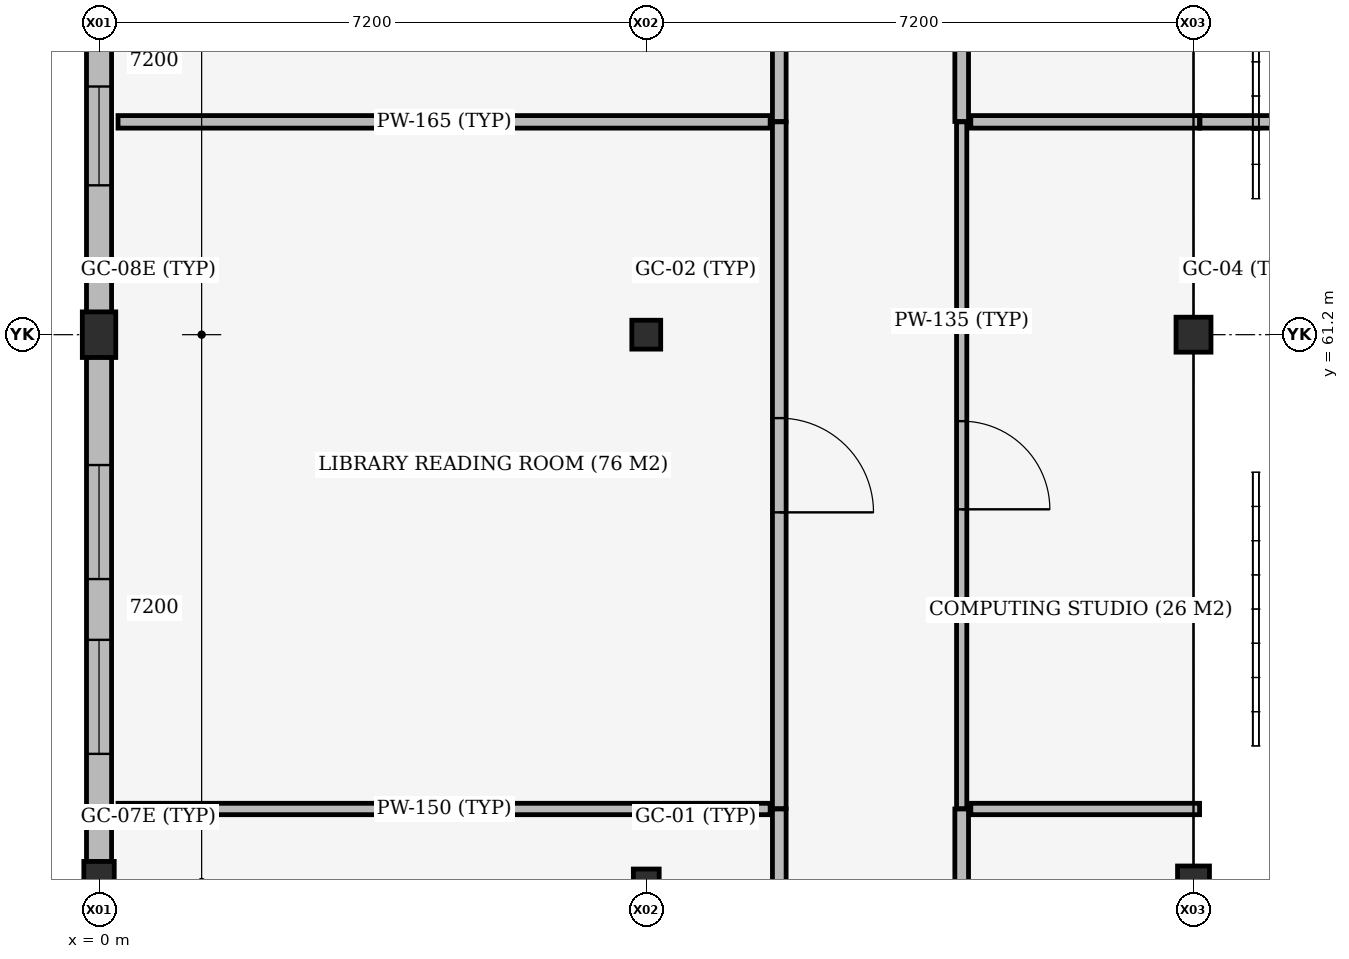
"""IFC4 building model, lengths in metres.
Left out: names, types, materials, properties, quantities, classifications, styles, units other than length and angle.
Written with IfcOpenShell. Run it as: python <this file> out.ifc"""

import sys

from ifc_helpers import new_model, si_unit, direction, frame, frame_2d, origin, origin_2d, place, context, subcontext, project, spatial, rectangle, extrude, element, fill, save


model = new_model("IFC4")
c1 = context("Model", 3, precision=1e-05, world=origin(), true_north=direction((0.0, 1.0)))
c2 = subcontext(c1, "Body", "Model", "MODEL_VIEW")
j1 = project(units=[si_unit("LENGTHUNIT", "METRE"), si_unit("PLANEANGLEUNIT", "RADIAN")], contexts=[c1])
p1 = place(None, origin())
s1 = spatial("IfcSite", under=j1, at=p1, CompositionType="ELEMENT")
p2 = place(p1, origin())
s2 = spatial("IfcBuilding", under=s1, at=p2, CompositionType="ELEMENT")
p3 = place(p2, frame((0.0, 0.0, 18.0)))
s3 = spatial("IfcBuildingStorey", under=s2, at=p3, CompositionType="ELEMENT", Elevation=18.0)
p4 = place(p3, frame((0.0, 54.0, 0.0), z_axis=(0.0, 0.0, 1.0), x_axis=(1.0, 0.0, 0.0)))
e1 = element("IfcColumn", 1, at=p4, inside=s3, PredefinedType="COLUMN", context=c2, shape_type="SweptSolid", body=[
    extrude(rectangle(XDim=0.4, YDim=0.54, at=origin_2d()), origin(), (0.0, 0.0, 1.0), 3.935),
])
p5 = place(p3, frame((0.0, 61.2, 0.0), z_axis=(0.0, 0.0, 1.0), x_axis=(1.0, 0.0, 0.0)))
e2 = element("IfcColumn", 2, at=p5, inside=s3, PredefinedType="COLUMN", context=c2, shape_type="SweptSolid", body=[
    extrude(rectangle(XDim=0.44, YDim=0.6, at=origin_2d()), origin(), (0.0, 0.0, 1.0), 3.935),
])
p6 = place(p3, frame((7.2, 54.0, 0.0), z_axis=(0.0, 0.0, 1.0), x_axis=(1.0, 0.0, 0.0)))
e3 = element("IfcColumn", 3, at=p6, inside=s3, PredefinedType="COLUMN", context=c2, shape_type="SweptSolid", body=[
    extrude(rectangle(XDim=0.34, YDim=0.34, at=origin_2d()), origin(), (0.0, 0.0, 1.0), 3.935),
])
p7 = place(p3, frame((7.2, 61.2, 0.0), z_axis=(0.0, 0.0, 1.0), x_axis=(1.0, 0.0, 0.0)))
e4 = element("IfcColumn", 4, at=p7, inside=s3, PredefinedType="COLUMN", context=c2, shape_type="SweptSolid", body=[
    extrude(rectangle(XDim=0.38, YDim=0.38, at=origin_2d()), origin(), (0.0, 0.0, 1.0), 3.935),
])
p8 = place(p3, frame((14.4, 54.0, 0.0), z_axis=(0.0, 0.0, 1.0), x_axis=(1.0, 0.0, 0.0)))
e5 = element("IfcColumn", 5, at=p8, inside=s3, PredefinedType="COLUMN", context=c2, shape_type="SweptSolid", body=[
    extrude(rectangle(XDim=0.42, YDim=0.42, at=origin_2d()), origin(), (0.0, 0.0, 1.0), 3.935),
])
p9 = place(p3, frame((14.4, 61.2, 0.0), z_axis=(0.0, 0.0, 1.0), x_axis=(1.0, 0.0, 0.0)))
e6 = element("IfcColumn", 6, at=p9, inside=s3, PredefinedType="COLUMN", context=c2, shape_type="SweptSolid", body=[
    extrude(rectangle(XDim=0.46, YDim=0.46, at=origin_2d()), origin(), (0.0, 0.0, 1.0), 3.935),
])
p10 = place(p3, frame((0.0, 54.262, 0.0), z_axis=(0.0, 0.0, 1.0), x_axis=(0.0, 1.0, 0.0)))
e7 = element("IfcWall", 7, at=p10, inside=s3, PredefinedType="STANDARD", context=c2, shape_type="SweptSolid", body=[
    extrude(rectangle(XDim=6.646, YDim=0.33, at=frame_2d((3.323, 0.0))), origin(), (0.0, 0.0, 1.0), 3.295),
])
p11 = place(p10, frame((1.423, 0.0, 0.95)))
e8 = element("IfcOpeningElement", 8, at=p11, cuts=e7, PredefinedType="OPENING", context=c2, shape_type="SweptSolid", body=[
    extrude(rectangle(XDim=1.5, YDim=1.8, at=frame_2d((0.75, 0.9))), frame((0.0, 0.175, 0.0), z_axis=(0.0, -1.0, 0.0), x_axis=(1.0, 0.0, 0.0)), (0.0, 0.0, 1.0), 0.35),
])
p12 = place(p10, frame((3.723, 0.0, 0.95)))
e9 = element("IfcOpeningElement", 9, at=p12, cuts=e7, PredefinedType="OPENING", context=c2, shape_type="SweptSolid", body=[
    extrude(rectangle(XDim=1.5, YDim=1.8, at=frame_2d((0.75, 0.9))), frame((0.0, 0.175, 0.0), z_axis=(0.0, -1.0, 0.0), x_axis=(1.0, 0.0, 0.0)), (0.0, 0.0, 1.0), 0.35),
])
p13 = place(p3, frame((0.0, 61.492, 0.0), z_axis=(0.0, 0.0, 1.0), x_axis=(0.0, 1.0, 0.0)))
e10 = element("IfcWall", 10, at=p13, inside=s3, PredefinedType="STANDARD", context=c2, shape_type="SweptSolid", body=[
    extrude(rectangle(XDim=6.746, YDim=0.33, at=frame_2d((3.373, 0.0))), origin(), (0.0, 0.0, 1.0), 3.935),
])
p14 = place(p13, frame((1.673, 0.0, 0.95)))
e11 = element("IfcOpeningElement", 11, at=p14, cuts=e10, PredefinedType="OPENING", context=c2, shape_type="SweptSolid", body=[
    extrude(rectangle(XDim=1.3, YDim=1.8, at=frame_2d((0.65, 0.9))), frame((0.0, 0.175, 0.0), z_axis=(0.0, -1.0, 0.0), x_axis=(1.0, 0.0, 0.0)), (0.0, 0.0, 1.0), 0.35),
])
p15 = place(p13, frame((3.773, 0.0, 0.95)))
e12 = element("IfcOpeningElement", 12, at=p15, cuts=e10, PredefinedType="OPENING", context=c2, shape_type="SweptSolid", body=[
    extrude(rectangle(XDim=1.3, YDim=1.8, at=frame_2d((0.65, 0.9))), frame((0.0, 0.175, 0.0), z_axis=(0.0, -1.0, 0.0), x_axis=(1.0, 0.0, 0.0)), (0.0, 0.0, 1.0), 0.35),
])
p16 = place(p3, frame((8.95, 43.205, 0.0), z_axis=(0.0, 0.0, 1.0), x_axis=(0.0, 1.0, 0.0)))
e13 = element("IfcWall", 13, at=p16, inside=s3, PredefinedType="PARTITIONING", context=c2, shape_type="SweptSolid", body=[
    extrude(rectangle(XDim=11.755, YDim=0.18, at=frame_2d((5.877, 0.0))), origin(), (0.0, 0.0, 1.0), 3.255),
])
p17 = place(p16, frame((5.268, 0.0, 0.0)))
e14 = element("IfcOpeningElement", 14, at=p17, cuts=e13, PredefinedType="OPENING", context=c2, shape_type="SweptSolid", body=[
    extrude(rectangle(XDim=1.22, YDim=2.25, at=frame_2d((0.61, 1.125))), frame((0.0, 0.1, 0.0), z_axis=(0.0, -1.0, 0.0), x_axis=(1.0, 0.0, 0.0)), (0.0, 0.0, 1.0), 0.2),
])
p18 = place(p3, frame((0.25, 54.96, 0.0), z_axis=(0.0, 0.0, 1.0), x_axis=(1.0, 0.0, 0.0)))
e15 = element("IfcWall", 15, at=p18, inside=s3, PredefinedType="PARTITIONING", context=c2, shape_type="SweptSolid", body=[
    extrude(rectangle(XDim=8.58, YDim=0.15, at=frame_2d((4.29, 0.0))), origin(), (0.0, 0.0, 1.0), 3.255),
])
p19 = place(p3, frame((8.95, 54.965, 0.0), z_axis=(0.0, 0.0, 1.0), x_axis=(0.0, 1.0, 0.0)))
e16 = element("IfcWall", 16, at=p19, inside=s3, PredefinedType="PARTITIONING", context=c2, shape_type="SweptSolid", body=[
    extrude(rectangle(XDim=9.035, YDim=0.18, at=frame_2d((4.518, 0.0))), origin(), (0.0, 0.0, 1.0), 3.195),
])
p20 = place(p19, frame((3.897, 0.0, 0.0)))
e17 = element("IfcOpeningElement", 17, at=p20, cuts=e16, PredefinedType="OPENING", context=c2, shape_type="SweptSolid", body=[
    extrude(rectangle(XDim=1.24, YDim=2.25, at=frame_2d((0.62, 1.125))), frame((0.0, 0.1, 0.0), z_axis=(0.0, -1.0, 0.0), x_axis=(1.0, 0.0, 0.0)), (0.0, 0.0, 1.0), 0.2),
])
p21 = place(p3, frame((0.25, 64.0, 0.0), z_axis=(0.0, 0.0, 1.0), x_axis=(1.0, 0.0, 0.0)))
e18 = element("IfcWall", 18, at=p21, inside=s3, PredefinedType="PARTITIONING", context=c2, shape_type="SweptSolid", body=[
    extrude(rectangle(XDim=8.58, YDim=0.165, at=frame_2d((4.29, 0.0))), origin(), (0.0, 0.0, 1.0), 3.935),
])
p22 = place(p3, frame((8.95, 64.005, 0.0), z_axis=(0.0, 0.0, 1.0), x_axis=(0.0, 1.0, 0.0)))
e19 = element("IfcWall", 19, at=p22, inside=s3, PredefinedType="PARTITIONING", context=c2, shape_type="SweptSolid", body=[
    extrude(rectangle(XDim=4.39, YDim=0.18, at=frame_2d((2.195, 0.0))), origin(), (0.0, 0.0, 1.0), 3.935),
])
p23 = place(p22, frame((1.585, 0.0, 0.0)))
e20 = element("IfcOpeningElement", 20, at=p23, cuts=e19, PredefinedType="OPENING", context=c2, shape_type="SweptSolid", body=[
    extrude(rectangle(XDim=1.22, YDim=2.25, at=frame_2d((0.61, 1.125))), frame((0.0, 0.1, 0.0), z_axis=(0.0, -1.0, 0.0), x_axis=(1.0, 0.0, 0.0)), (0.0, 0.0, 1.0), 0.2),
])
p24 = place(p3, frame((11.35, 41.405, 0.0), z_axis=(0.0, 0.0, 1.0), x_axis=(0.0, 1.0, 0.0)))
e21 = element("IfcWall", 21, at=p24, inside=s3, PredefinedType="PARTITIONING", context=c2, shape_type="SweptSolid", body=[
    extrude(rectangle(XDim=13.555, YDim=0.18, at=frame_2d((6.777, 0.0))), origin(), (0.0, 0.0, 1.0), 3.255),
])
p25 = place(p24, frame((6.167, 0.0, 0.0)))
e22 = element("IfcOpeningElement", 22, at=p25, cuts=e21, PredefinedType="OPENING", context=c2, shape_type="SweptSolid", body=[
    extrude(rectangle(XDim=1.22, YDim=2.25, at=frame_2d((0.61, 1.125))), frame((0.0, 0.1, 0.0), z_axis=(0.0, -1.0, 0.0), x_axis=(1.0, 0.0, 0.0)), (0.0, 0.0, 1.0), 0.2),
])
p26 = place(p3, frame((11.47, 54.96, 0.0), z_axis=(0.0, 0.0, 1.0), x_axis=(1.0, 0.0, 0.0)))
e23 = element("IfcWall", 23, at=p26, inside=s3, PredefinedType="PARTITIONING", context=c2, shape_type="SweptSolid", body=[
    extrude(rectangle(XDim=3.01, YDim=0.15, at=frame_2d((1.505, 0.0))), origin(), (0.0, 0.0, 1.0), 3.415),
])
p27 = place(p3, frame((11.35, 54.965, 0.0), z_axis=(0.0, 0.0, 1.0), x_axis=(0.0, 1.0, 0.0)))
e24 = element("IfcWall", 24, at=p27, inside=s3, PredefinedType="PARTITIONING", context=c2, shape_type="SweptSolid", body=[
    extrude(rectangle(XDim=9.035, YDim=0.135, at=frame_2d((4.518, 0.0))), origin(), (0.0, 0.0, 1.0), 3.195),
])
p28 = place(p27, frame((3.938, 0.0, 0.0)))
e25 = element("IfcOpeningElement", 25, at=p28, cuts=e24, PredefinedType="OPENING", context=c2, shape_type="SweptSolid", body=[
    extrude(rectangle(XDim=1.16, YDim=2.2, at=frame_2d((0.58, 1.1))), frame((0.0, 0.077, 0.0), z_axis=(0.0, -1.0, 0.0), x_axis=(1.0, 0.0, 0.0)), (0.0, 0.0, 1.0), 0.155),
])
p29 = place(p3, frame((11.47, 64.0, 0.0), z_axis=(0.0, 0.0, 1.0), x_axis=(1.0, 0.0, 0.0)))
e26 = element("IfcWall", 26, at=p29, inside=s3, PredefinedType="PARTITIONING", context=c2, shape_type="SweptSolid", body=[
    extrude(rectangle(XDim=3.01, YDim=0.165, at=frame_2d((1.505, 0.0))), origin(), (0.0, 0.0, 1.0), 3.935),
])
p30 = place(p3, frame((11.35, 64.005, 0.0), z_axis=(0.0, 0.0, 1.0), x_axis=(0.0, 1.0, 0.0)))
e27 = element("IfcWall", 27, at=p30, inside=s3, PredefinedType="PARTITIONING", context=c2, shape_type="SweptSolid", body=[
    extrude(rectangle(XDim=4.39, YDim=0.18, at=frame_2d((2.195, 0.0))), origin(), (0.0, 0.0, 1.0), 3.935),
])
p31 = place(p30, frame((1.585, 0.0, 0.0)))
e28 = element("IfcOpeningElement", 28, at=p31, cuts=e27, PredefinedType="OPENING", context=c2, shape_type="SweptSolid", body=[
    extrude(rectangle(XDim=1.22, YDim=2.25, at=frame_2d((0.61, 1.125))), frame((0.0, 0.1, 0.0), z_axis=(0.0, -1.0, 0.0), x_axis=(1.0, 0.0, 0.0)), (0.0, 0.0, 1.0), 0.2),
])
p32 = place(p3, frame((14.485, 64.0, 0.0), z_axis=(0.0, 0.0, 1.0), x_axis=(1.0, 0.0, 0.0)))
e29 = element("IfcWall", 29, at=p32, inside=s3, PredefinedType="PARTITIONING", context=c2, shape_type="SweptSolid", body=[
    extrude(rectangle(XDim=15.895, YDim=0.165, at=frame_2d((7.947, 0.0))), origin(), (0.0, 0.0, 1.0), 3.935),
])
p33 = place(p11, origin())
e30 = element("IfcWindow", 30, at=p33, inside=s3, PartitioningType="DOUBLE_PANEL_VERTICAL", PredefinedType="WINDOW", context=c2, shape_type="SweptSolid", body=[
    extrude(rectangle(XDim=1.5, YDim=1.8, at=frame_2d((0.75, 0.9))), frame((0.0, 0.03, 0.0), z_axis=(0.0, -1.0, 0.0), x_axis=(1.0, 0.0, 0.0)), (0.0, 0.0, 1.0), 0.06),
])
fill(e8, e30)
p34 = place(p12, origin())
e31 = element("IfcWindow", 31, at=p34, inside=s3, PartitioningType="DOUBLE_PANEL_VERTICAL", PredefinedType="WINDOW", context=c2, shape_type="SweptSolid", body=[
    extrude(rectangle(XDim=1.5, YDim=1.8, at=frame_2d((0.75, 0.9))), frame((0.0, 0.03, 0.0), z_axis=(0.0, -1.0, 0.0), x_axis=(1.0, 0.0, 0.0)), (0.0, 0.0, 1.0), 0.06),
])
fill(e9, e31)
p35 = place(p14, origin())
e32 = element("IfcWindow", 32, at=p35, inside=s3, PartitioningType="DOUBLE_PANEL_VERTICAL", PredefinedType="WINDOW", context=c2, shape_type="SweptSolid", body=[
    extrude(rectangle(XDim=1.3, YDim=1.8, at=frame_2d((0.65, 0.9))), frame((0.0, 0.03, 0.0), z_axis=(0.0, -1.0, 0.0), x_axis=(1.0, 0.0, 0.0)), (0.0, 0.0, 1.0), 0.06),
])
fill(e11, e32)
p36 = place(p20, origin())
e33 = element("IfcDoor", 33, at=p36, inside=s3, OperationType="SINGLE_SWING_RIGHT", PredefinedType="DOOR", context=c2, shape_type="SweptSolid", body=[
    extrude(rectangle(XDim=1.24, YDim=2.25, at=frame_2d((0.62, 1.125))), frame((0.0, 0.025, 0.0), z_axis=(0.0, -1.0, 0.0), x_axis=(1.0, 0.0, 0.0)), (0.0, 0.0, 1.0), 0.05),
])
fill(e17, e33)
p37 = place(p28, origin())
e34 = element("IfcDoor", 34, at=p37, inside=s3, OperationType="SINGLE_SWING_RIGHT", PredefinedType="DOOR", context=c2, shape_type="SweptSolid", body=[
    extrude(rectangle(XDim=1.16, YDim=2.2, at=frame_2d((0.58, 1.1))), frame((0.0, 0.025, 0.0), z_axis=(0.0, -1.0, 0.0), x_axis=(1.0, 0.0, 0.0)), (0.0, 0.0, 1.0), 0.05),
])
fill(e25, e34)
save(model, sys.argv[1])
